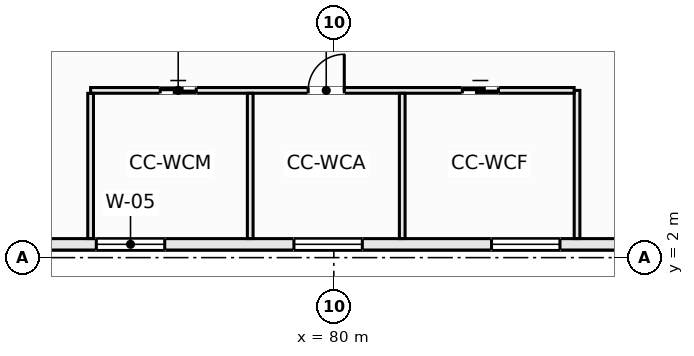
"""IFC4 building model, lengths in metres.
Left out: names, types, materials, properties, quantities, classifications, styles, units other than length and angle.
Written with IfcOpenShell. Run it as: python <this file> out.ifc"""

import sys

from ifc_helpers import new_model, si_unit, direction, frame, frame_2d, origin, place, context, subcontext, project, spatial, rectangle, extrude, element, fill, save


model = new_model("IFC4")
c1 = context("Model", 3, precision=1e-05, world=origin(), true_north=direction((0.0, 1.0)))
c2 = subcontext(c1, "Body", "Model", "MODEL_VIEW")
j1 = project(units=[si_unit("LENGTHUNIT", "METRE"), si_unit("PLANEANGLEUNIT", "RADIAN")], contexts=[c1])
p1 = place(None, origin())
s1 = spatial("IfcSite", under=j1, at=p1, CompositionType="ELEMENT")
p2 = place(p1, origin())
s2 = spatial("IfcBuilding", under=s1, at=p2, CompositionType="ELEMENT")
p3 = place(p2, frame((0.0, 0.0, 15.0)))
s3 = spatial("IfcBuildingStorey", under=s2, at=p3, CompositionType="ELEMENT", Elevation=15.0)
p4 = place(p3, frame((62.35, 2.35, 0.0), z_axis=(0.0, 0.0, 1.0), x_axis=(1.0, 0.0, 0.0)))
e1 = element("IfcWall", 1, at=p4, inside=s3, PredefinedType="SOLIDWALL", context=c2, shape_type="SweptSolid", body=[
    extrude(rectangle(XDim=35.3, YDim=0.3, at=frame_2d((17.65, 0.0))), origin(), (0.0, 0.0, 1.0), 5.76),
])
p5 = place(p4, frame((11.4, 0.0, 0.9)))
e2 = element("IfcOpeningElement", 2, at=p5, cuts=e1, PredefinedType="OPENING", context=c2, shape_type="SweptSolid", body=[
    extrude(rectangle(XDim=1.8, YDim=1.65, at=frame_2d((0.9, 0.825))), frame((0.0, 0.16, 0.0), z_axis=(0.0, -1.0, 0.0), x_axis=(1.0, 0.0, 0.0)), (0.0, 0.0, 1.0), 0.32),
])
p6 = place(p4, frame((16.6, 0.0, 0.9)))
e3 = element("IfcOpeningElement", 3, at=p6, cuts=e1, PredefinedType="OPENING", context=c2, shape_type="SweptSolid", body=[
    extrude(rectangle(XDim=1.8, YDim=1.65, at=frame_2d((0.9, 0.825))), frame((0.0, 0.16, 0.0), z_axis=(0.0, -1.0, 0.0), x_axis=(1.0, 0.0, 0.0)), (0.0, 0.0, 1.0), 0.32),
])
p7 = place(p4, frame((21.8, 0.0, 0.9)))
e4 = element("IfcOpeningElement", 4, at=p7, cuts=e1, PredefinedType="OPENING", context=c2, shape_type="SweptSolid", body=[
    extrude(rectangle(XDim=1.8, YDim=1.65, at=frame_2d((0.9, 0.825))), frame((0.0, 0.16, 0.0), z_axis=(0.0, -1.0, 0.0), x_axis=(1.0, 0.0, 0.0)), (0.0, 0.0, 1.0), 0.32),
])
p8 = place(p3, frame((86.4, 2.502, 0.0), z_axis=(0.0, 0.0, 1.0), x_axis=(0.0, 1.0, 0.0)))
e5 = element("IfcWall", 5, at=p8, inside=s3, PredefinedType="PARTITIONING", context=c2, shape_type="SweptSolid", body=[
    extrude(rectangle(XDim=3.898, YDim=0.15, at=frame_2d((1.949, 0.0))), origin(), (0.0, 0.0, 1.0), 5.76),
])
p9 = place(p3, frame((73.6, 6.4, 0.0), z_axis=(0.0, 0.0, 1.0), x_axis=(1.0, 0.0, 0.0)))
e6 = element("IfcWall", 6, at=p9, inside=s3, PredefinedType="PARTITIONING", context=c2, shape_type="SweptSolid", body=[
    extrude(rectangle(XDim=12.723, YDim=0.15, at=frame_2d((6.361, 0.0))), origin(), (0.0, 0.0, 1.0), 5.76),
])
p10 = place(p9, frame((1.83, 0.0, 0.0)))
e7 = element("IfcOpeningElement", 7, at=p10, cuts=e6, PredefinedType="OPENING", context=c2, shape_type="SweptSolid", body=[
    extrude(rectangle(XDim=0.95, YDim=2.1, at=frame_2d((0.475, 1.05))), frame((0.0, 0.085, 0.0), z_axis=(0.0, -1.0, 0.0), x_axis=(1.0, 0.0, 0.0)), (0.0, 0.0, 1.0), 0.17),
])
p11 = place(p9, frame((5.725, 0.0, 0.0)))
e8 = element("IfcOpeningElement", 8, at=p11, cuts=e6, PredefinedType="OPENING", context=c2, shape_type="SweptSolid", body=[
    extrude(rectangle(XDim=0.95, YDim=2.1, at=frame_2d((0.475, 1.05))), frame((0.0, 0.085, 0.0), z_axis=(0.0, -1.0, 0.0), x_axis=(1.0, 0.0, 0.0)), (0.0, 0.0, 1.0), 0.17),
])
p12 = place(p9, frame((9.781, 0.0, 0.0)))
e9 = element("IfcOpeningElement", 9, at=p12, cuts=e6, PredefinedType="OPENING", context=c2, shape_type="SweptSolid", body=[
    extrude(rectangle(XDim=0.95, YDim=2.1, at=frame_2d((0.475, 1.05))), frame((0.0, 0.085, 0.0), z_axis=(0.0, -1.0, 0.0), x_axis=(1.0, 0.0, 0.0)), (0.0, 0.0, 1.0), 0.17),
])
for number, where, z_axis, x_axis in (
    (10, (73.6, 2.502, 0.0), (0.0, 0.0, 1.0), (0.0, 1.0, 0.0)),
    (11, (77.8, 2.502, 0.0), (0.0, 0.0, 1.0), (0.0, 1.0, 0.0)),
    (12, (81.8, 2.502, 0.0), (0.0, 0.0, 1.0), (0.0, 1.0, 0.0)),
):
    element("IfcWall", number, at=place(p3, frame(where, z_axis=z_axis, x_axis=x_axis)), inside=s3, PredefinedType="PARTITIONING", context=c2, shape_type="SweptSolid", body=[
        extrude(rectangle(XDim=3.821, YDim=0.15, at=frame_2d((1.911, 0.0))), origin(), (0.0, 0.0, 1.0), 5.76),
    ])
p13 = place(p5, origin())
e13 = element("IfcWindow", 13, at=p13, inside=s3, PartitioningType="SINGLE_PANEL", PredefinedType="WINDOW", context=c2, shape_type="SweptSolid", body=[
    extrude(rectangle(XDim=1.8, YDim=1.65, at=frame_2d((0.9, 0.825))), frame((0.0, 0.03, 0.0), z_axis=(0.0, -1.0, 0.0), x_axis=(1.0, 0.0, 0.0)), (0.0, 0.0, 1.0), 0.06),
])
fill(e2, e13)
p14 = place(p6, origin())
e14 = element("IfcWindow", 14, at=p14, inside=s3, PartitioningType="SINGLE_PANEL", PredefinedType="WINDOW", context=c2, shape_type="SweptSolid", body=[
    extrude(rectangle(XDim=1.8, YDim=1.65, at=frame_2d((0.9, 0.825))), frame((0.0, 0.03, 0.0), z_axis=(0.0, -1.0, 0.0), x_axis=(1.0, 0.0, 0.0)), (0.0, 0.0, 1.0), 0.06),
])
fill(e3, e14)
p15 = place(p7, origin())
e15 = element("IfcWindow", 15, at=p15, inside=s3, PartitioningType="SINGLE_PANEL", PredefinedType="WINDOW", context=c2, shape_type="SweptSolid", body=[
    extrude(rectangle(XDim=1.8, YDim=1.65, at=frame_2d((0.9, 0.825))), frame((0.0, 0.03, 0.0), z_axis=(0.0, -1.0, 0.0), x_axis=(1.0, 0.0, 0.0)), (0.0, 0.0, 1.0), 0.06),
])
fill(e4, e15)
p16 = place(p10, origin())
e16 = element("IfcDoor", 16, at=p16, inside=s3, OperationType="SINGLE_SWING_LEFT", PredefinedType="DOOR", context=c2, shape_type="SweptSolid", body=[
    extrude(rectangle(XDim=0.95, YDim=2.1, at=frame_2d((0.475, 1.05))), frame((0.0, 0.025, 0.0), z_axis=(0.0, -1.0, 0.0), x_axis=(1.0, 0.0, 0.0)), (0.0, 0.0, 1.0), 0.05),
])
fill(e7, e16)
p17 = place(p11, origin())
e17 = element("IfcDoor", 17, at=p17, inside=s3, OperationType="SINGLE_SWING_RIGHT", PredefinedType="DOOR", context=c2, shape_type="SweptSolid", body=[
    extrude(rectangle(XDim=0.95, YDim=2.1, at=frame_2d((0.475, 1.05))), frame((0.0, 0.025, 0.0), z_axis=(0.0, -1.0, 0.0), x_axis=(1.0, 0.0, 0.0)), (0.0, 0.0, 1.0), 0.05),
])
fill(e8, e17)
p18 = place(p12, origin())
e18 = element("IfcDoor", 18, at=p18, inside=s3, OperationType="SINGLE_SWING_LEFT", PredefinedType="DOOR", context=c2, shape_type="SweptSolid", body=[
    extrude(rectangle(XDim=0.95, YDim=2.1, at=frame_2d((0.475, 1.05))), frame((0.0, 0.025, 0.0), z_axis=(0.0, -1.0, 0.0), x_axis=(1.0, 0.0, 0.0)), (0.0, 0.0, 1.0), 0.05),
])
fill(e9, e18)
save(model, sys.argv[1])
